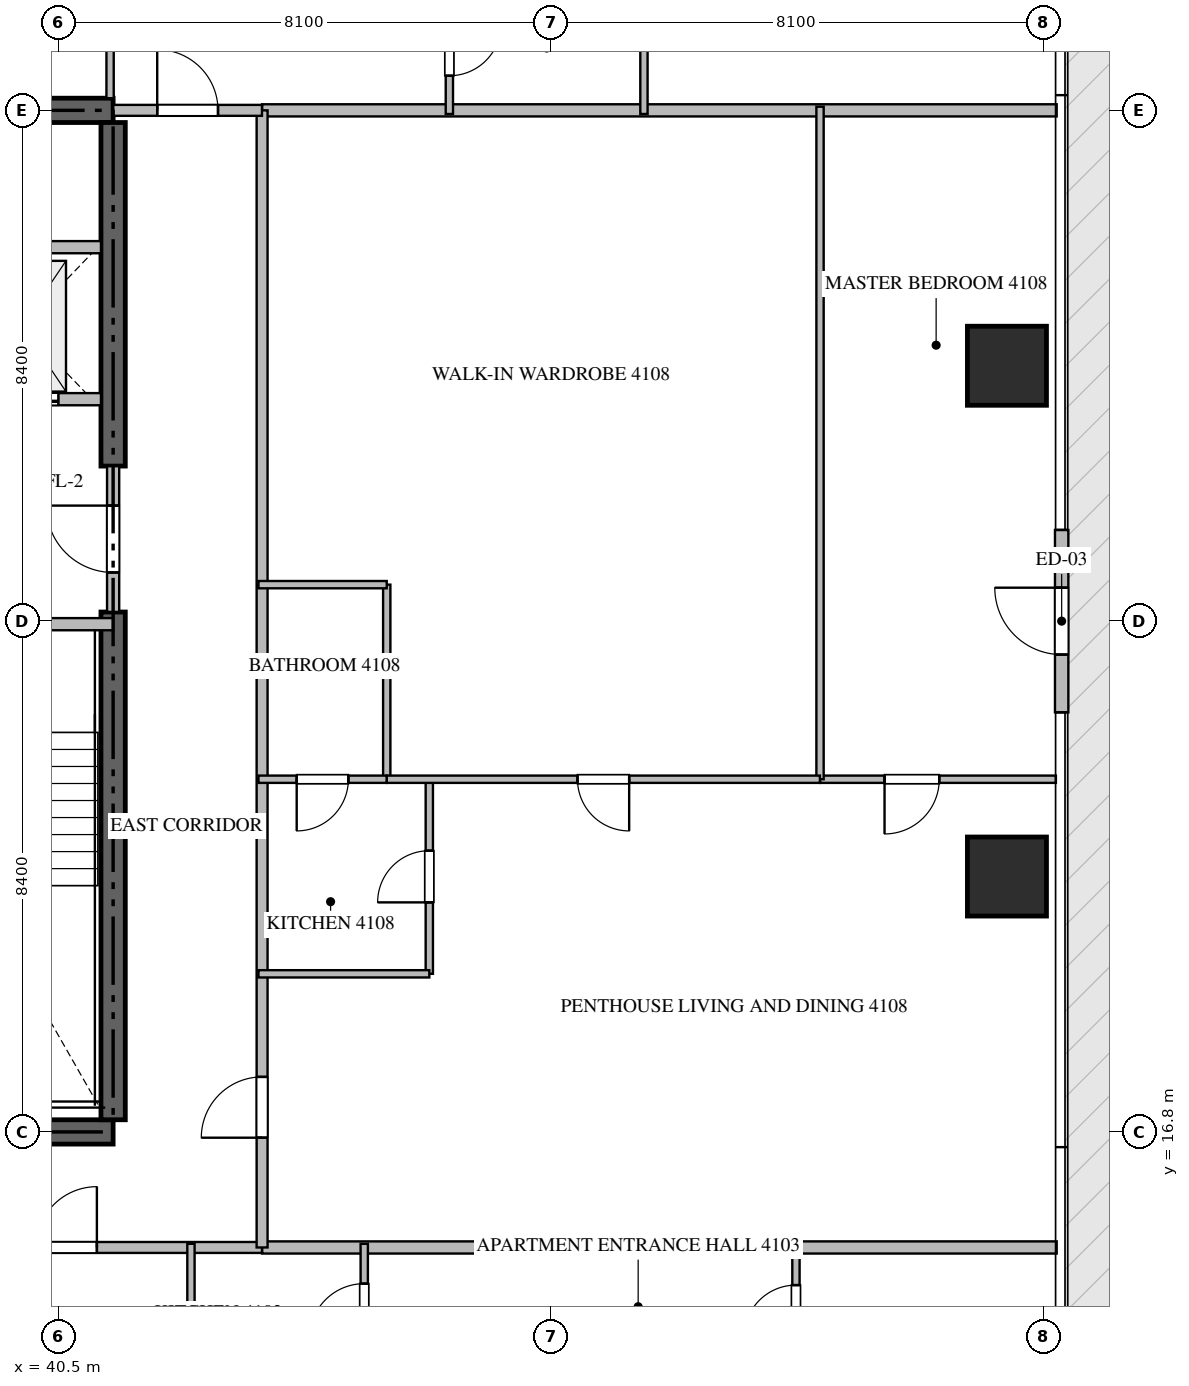
"""IFC4 building model, lengths in metres.
Left out: names, types, materials, properties, quantities, classifications, styles, units other than length and angle.
Written with IfcOpenShell. Run it as: python <this file> out.ifc"""

import sys

from ifc_helpers import new_model, si_unit, direction, frame, frame_2d, origin, origin_2d, place, context, subcontext, project, spatial, rectangle, extrude, source, transform, mapped, element, fill, save


model = new_model("IFC4")
c1 = context("Model", 3, precision=1e-05, world=origin(), true_north=direction((0.0, 1.0)))
c2 = subcontext(c1, "Body", "Model", "MODEL_VIEW")
j1 = project(units=[si_unit("LENGTHUNIT", "METRE"), si_unit("PLANEANGLEUNIT", "RADIAN")], contexts=[c1])
p1 = place(None, origin())
s1 = spatial("IfcSite", under=j1, at=p1, CompositionType="ELEMENT")
p2 = place(p1, origin())
s2 = spatial("IfcBuilding", under=s1, at=p2, CompositionType="ELEMENT")
p3 = place(p2, frame((0.0, 0.0, 165.15)))
s3 = spatial("IfcBuildingStorey", under=s2, at=p3, CompositionType="ELEMENT", Elevation=165.15)
for number, where, z_axis, x_axis in (
    (1, (23.4, 16.8, -0.26), (0.0, 0.0, 1.0), (1.0, 0.0, 0.0)),
    (2, (41.4, 33.6, -0.26), (0.0, 0.0, 1.0), (-1.0, 0.0, 0.0)),
):
    element("IfcWall", number, at=place(p3, frame(where, z_axis=z_axis, x_axis=x_axis)), inside=s3, PredefinedType="SHEAR", context=c2, shape_type="SweptSolid", body=[
        extrude(rectangle(XDim=18.0, YDim=0.4, at=frame_2d((9.0, 0.0))), origin(), (0.0, 0.0, 1.0), 3.748),
    ])
p4 = place(p3, frame((41.4, 17.0, -0.26), z_axis=(0.0, 0.0, 1.0), x_axis=(0.0, 1.0, 0.0)))
e3 = element("IfcWall", 3, at=p4, inside=s3, PredefinedType="SHEAR", context=c2, shape_type="SweptSolid", body=[
    extrude(rectangle(XDim=8.35, YDim=0.4, at=frame_2d((4.175, 0.0))), origin(), (0.0, 0.0, 1.0), 3.748),
])
p5 = place(p3, frame((41.4, 27.75, -0.26), z_axis=(0.0, 0.0, 1.0), x_axis=(0.0, 1.0, 0.0)))
e4 = element("IfcWall", 4, at=p5, inside=s3, PredefinedType="SHEAR", context=c2, shape_type="SweptSolid", body=[
    extrude(rectangle(XDim=5.65, YDim=0.4, at=frame_2d((2.825, 0.0))), origin(), (0.0, 0.0, 1.0), 3.748),
])
m1 = source(origin(), c2, "Body", "SweptSolid", [
    extrude(rectangle(XDim=1.3, YDim=1.3, at=origin_2d()), origin(), (0.0, 0.0, 1.0), 3.75),
])
for number, where, z_axis, x_axis in (
    (5, (56.1, 21.0, -0.26), (0.0, 0.0, 1.0), (1.0, 0.0, 0.0)),
    (6, (56.1, 29.4, -0.26), (0.0, 0.0, 1.0), (1.0, 0.0, 0.0)),
):
    element("IfcColumn", number, at=place(p3, frame(where, z_axis=z_axis, x_axis=x_axis)), inside=s3, PredefinedType="COLUMN", context=c2, shape_type="MappedRepresentation", body=[
        mapped(m1, transform((0.0, 0.0, 0.0), scale=1.0)),
    ])
p6 = place(p3, frame((57.0, 23.7, 0.0), z_axis=(0.0, 0.0, 1.0), x_axis=(0.0, 1.0, 0.0)))
e7 = element("IfcWall", 7, at=p6, inside=s3, PredefinedType="ELEMENTEDWALL", context=c2, shape_type="SweptSolid", body=[
    extrude(rectangle(XDim=3.0, YDim=0.22, at=frame_2d((1.5, 0.0))), origin(), (0.0, 0.0, 1.0), 3.475),
])
p7 = place(p6, frame((0.95, 0.0, 0.0)))
e8 = element("IfcOpeningElement", 8, at=p7, cuts=e7, PredefinedType="OPENING", context=c2, shape_type="SweptSolid", body=[
    extrude(rectangle(XDim=1.1, YDim=2.2, at=frame_2d((0.55, 1.1))), frame((0.0, 0.12, 0.0), z_axis=(0.0, -1.0, 0.0), x_axis=(1.0, 0.0, 0.0)), (0.0, 0.0, 1.0), 0.24),
])
p8 = place(p3, frame((36.95, 25.15, 0.0), z_axis=(0.0, 0.0, 1.0), x_axis=(1.0, 0.0, 0.0)))
e9 = element("IfcWall", 9, at=p8, inside=s3, PredefinedType="STANDARD", context=c2, shape_type="SweptSolid", body=[
    extrude(rectangle(XDim=4.45, YDim=0.2, at=frame_2d((2.225, 0.0))), origin(), (0.0, 0.0, 1.0), 3.49),
])
p9 = place(p8, frame((1.65, 0.0, 0.0)))
e10 = element("IfcOpeningElement", 10, at=p9, cuts=e9, PredefinedType="OPENING", context=c2, shape_type="SweptSolid", body=[
    extrude(rectangle(XDim=1.1, YDim=2.15, at=frame_2d((0.55, 1.075))), frame((0.0, 0.11, 0.0), z_axis=(0.0, -1.0, 0.0), x_axis=(1.0, 0.0, 0.0)), (0.0, 0.0, 1.0), 0.22),
])
p10 = place(p3, frame((38.75, 28.85, 0.0), z_axis=(0.0, 0.0, 1.0), x_axis=(1.0, 0.0, 0.0)))
e11 = element("IfcWall", 11, at=p10, inside=s3, PredefinedType="STANDARD", context=c2, shape_type="SweptSolid", body=[
    extrude(rectangle(XDim=2.45, YDim=0.2, at=frame_2d((1.225, 0.0))), origin(), (0.0, 0.0, 1.0), 3.49),
])
p11 = place(p10, frame((0.55, 0.0, 0.0)))
e12 = element("IfcOpeningElement", 12, at=p11, cuts=e11, PredefinedType="OPENING", context=c2, shape_type="SweptSolid", body=[
    extrude(rectangle(XDim=1.2, YDim=2.2, at=frame_2d((0.6, 1.1))), frame((0.0, 0.11, 0.0), z_axis=(0.0, -1.0, 0.0), x_axis=(1.0, 0.0, 0.0)), (0.0, 0.0, 1.0), 0.22),
])
p12 = place(p3, frame((38.75, 31.35, 0.0), z_axis=(0.0, 0.0, 1.0), x_axis=(1.0, 0.0, 0.0)))
e13 = element("IfcWall", 13, at=p12, inside=s3, PredefinedType="STANDARD", context=c2, shape_type="SweptSolid", body=[
    extrude(rectangle(XDim=2.45, YDim=0.2, at=frame_2d((1.225, 0.0))), origin(), (0.0, 0.0, 1.0), 3.49),
])
p13 = place(p3, frame((41.4, 25.352, 0.0), z_axis=(0.0, 0.0, 1.0), x_axis=(0.0, 1.0, 0.0)))
e14 = element("IfcWall", 14, at=p13, inside=s3, PredefinedType="STANDARD", context=c2, shape_type="SweptSolid", body=[
    extrude(rectangle(XDim=2.396, YDim=0.2, at=frame_2d((1.198, 0.0))), origin(), (0.0, 0.0, 1.0), 3.49),
])
p14 = place(p13, frame((0.648, 0.0, 0.0)))
e15 = element("IfcOpeningElement", 15, at=p14, cuts=e14, PredefinedType="OPENING", context=c2, shape_type="SweptSolid", body=[
    extrude(rectangle(XDim=1.1, YDim=2.15, at=frame_2d((0.55, 1.075))), frame((0.0, 0.11, 0.0), z_axis=(0.0, -1.0, 0.0), x_axis=(1.0, 0.0, 0.0)), (0.0, 0.0, 1.0), 0.22),
])
for number, where, z_axis, x_axis in (
    (16, (43.85, 14.9, 0.0), (0.0, 0.0, 1.0), (1.0, 0.0, 0.0)),
    (17, (43.85, 33.6, 0.0), (0.0, 0.0, 1.0), (1.0, 0.0, 0.0)),
):
    element("IfcWall", number, at=place(p3, frame(where, z_axis=z_axis, x_axis=x_axis)), inside=s3, PredefinedType="PARTITIONING", context=c2, shape_type="SweptSolid", body=[
        extrude(rectangle(XDim=13.068, YDim=0.2, at=frame_2d((6.534, 0.0))), origin(), (0.0, 0.0, 1.0), 3.49),
    ])
p15 = place(p3, frame((20.952, 14.9, 0.0), z_axis=(0.0, 0.0, 1.0), x_axis=(1.0, 0.0, 0.0)))
e18 = element("IfcWall", 18, at=p15, inside=s3, PredefinedType="PARTITIONING", context=c2, shape_type="SweptSolid", body=[
    extrude(rectangle(XDim=22.896, YDim=0.18, at=frame_2d((11.448, 0.0))), origin(), (0.0, 0.0, 1.0), 3.49),
])
p16 = place(p15, frame((2.387, 0.0, 0.0)))
e19 = element("IfcOpeningElement", 19, at=p16, cuts=e18, PredefinedType="OPENING", context=c2, shape_type="SweptSolid", body=[
    extrude(rectangle(XDim=1.0, YDim=2.15, at=frame_2d((0.5, 1.075))), frame((0.0, 0.1, 0.0), z_axis=(0.0, -1.0, 0.0), x_axis=(1.0, 0.0, 0.0)), (0.0, 0.0, 1.0), 0.2),
])
p17 = place(p15, frame((6.788, 0.0, 0.0)))
e20 = element("IfcOpeningElement", 20, at=p17, cuts=e18, PredefinedType="OPENING", context=c2, shape_type="SweptSolid", body=[
    extrude(rectangle(XDim=1.0, YDim=2.15, at=frame_2d((0.5, 1.075))), frame((0.0, 0.1, 0.0), z_axis=(0.0, -1.0, 0.0), x_axis=(1.0, 0.0, 0.0)), (0.0, 0.0, 1.0), 0.2),
])
p18 = place(p15, frame((19.181, 0.0, 0.0)))
e21 = element("IfcOpeningElement", 21, at=p18, cuts=e18, PredefinedType="OPENING", context=c2, shape_type="SweptSolid", body=[
    extrude(rectangle(XDim=1.0, YDim=2.15, at=frame_2d((0.5, 1.075))), frame((0.0, 0.1, 0.0), z_axis=(0.0, -1.0, 0.0), x_axis=(1.0, 0.0, 0.0)), (0.0, 0.0, 1.0), 0.2),
])
p19 = place(p3, frame((43.85, 14.9, 0.0), z_axis=(0.0, 0.0, 1.0), x_axis=(0.0, 1.0, 0.0)))
e22 = element("IfcWall", 22, at=p19, inside=s3, PredefinedType="PARTITIONING", context=c2, shape_type="SweptSolid", body=[
    extrude(rectangle(XDim=18.7, YDim=0.18, at=frame_2d((9.35, 0.0))), origin(), (0.0, 0.0, 1.0), 3.49),
])
p20 = place(p19, frame((1.805, 0.0, 0.0)))
e23 = element("IfcOpeningElement", 23, at=p20, cuts=e22, PredefinedType="OPENING", context=c2, shape_type="SweptSolid", body=[
    extrude(rectangle(XDim=1.0, YDim=2.15, at=frame_2d((0.5, 1.075))), frame((0.0, 0.1, 0.0), z_axis=(0.0, -1.0, 0.0), x_axis=(1.0, 0.0, 0.0)), (0.0, 0.0, 1.0), 0.2),
])
p21 = place(p3, frame((41.402, 33.6, 0.0), z_axis=(0.0, 0.0, 1.0), x_axis=(1.0, 0.0, 0.0)))
e24 = element("IfcWall", 24, at=p21, inside=s3, PredefinedType="PARTITIONING", context=c2, shape_type="SweptSolid", body=[
    extrude(rectangle(XDim=2.446, YDim=0.18, at=frame_2d((1.223, 0.0))), origin(), (0.0, 0.0, 1.0), 3.49),
])
p22 = place(p21, frame((0.723, 0.0, 0.0)))
e25 = element("IfcOpeningElement", 25, at=p22, cuts=e24, PredefinedType="OPENING", context=c2, shape_type="SweptSolid", body=[
    extrude(rectangle(XDim=1.0, YDim=2.15, at=frame_2d((0.5, 1.075))), frame((0.0, 0.1, 0.0), z_axis=(0.0, -1.0, 0.0), x_axis=(1.0, 0.0, 0.0)), (0.0, 0.0, 1.0), 0.2),
])
p23 = place(p3, frame((42.68, 12.15, 0.0), z_axis=(0.0, 0.0, 1.0), x_axis=(0.0, 1.0, 0.0)))
e26 = element("IfcWall", 26, at=p23, inside=s3, PredefinedType="PARTITIONING", context=c2, shape_type="SweptSolid", body=[
    extrude(rectangle(XDim=2.81, YDim=0.12, at=frame_2d((1.405, 0.0))), origin(), (0.0, 0.0, 1.0), 3.49),
])
p24 = place(p3, frame((45.53, 12.75, 0.0), z_axis=(0.0, 0.0, 1.0), x_axis=(0.0, 1.0, 0.0)))
e27 = element("IfcWall", 27, at=p24, inside=s3, PredefinedType="PARTITIONING", context=c2, shape_type="SweptSolid", body=[
    extrude(rectangle(XDim=2.21, YDim=0.12, at=frame_2d((1.105, 0.0))), origin(), (0.0, 0.0, 1.0), 3.49),
])
p25 = place(p24, frame((0.655, 0.0, 0.0)))
e28 = element("IfcOpeningElement", 28, at=p25, cuts=e27, PredefinedType="OPENING", context=c2, shape_type="SweptSolid", body=[
    extrude(rectangle(XDim=0.9, YDim=2.1, at=frame_2d((0.45, 1.05))), frame((0.0, 0.07, 0.0), z_axis=(0.0, -1.0, 0.0), x_axis=(1.0, 0.0, 0.0)), (0.0, 0.0, 1.0), 0.14),
])
p26 = place(p3, frame((52.63, 12.752, 0.0), z_axis=(0.0, 0.0, 1.0), x_axis=(0.0, 1.0, 0.0)))
e29 = element("IfcWall", 29, at=p26, inside=s3, PredefinedType="PARTITIONING", context=c2, shape_type="SweptSolid", body=[
    extrude(rectangle(XDim=2.208, YDim=0.12, at=frame_2d((1.104, 0.0))), origin(), (0.0, 0.0, 1.0), 3.49),
])
p27 = place(p26, frame((0.679, 0.0, 0.0)))
e30 = element("IfcOpeningElement", 30, at=p27, cuts=e29, PredefinedType="OPENING", context=c2, shape_type="SweptSolid", body=[
    extrude(rectangle(XDim=0.85, YDim=2.1, at=frame_2d((0.425, 1.05))), frame((0.0, 0.07, 0.0), z_axis=(0.0, -1.0, 0.0), x_axis=(1.0, 0.0, 0.0)), (0.0, 0.0, 1.0), 0.14),
])
p28 = place(p3, frame((41.35, 36.35, 0.0), z_axis=(0.0, 0.0, 1.0), x_axis=(0.0, -1.0, 0.0)))
e31 = element("IfcWall", 31, at=p28, inside=s3, PredefinedType="PARTITIONING", context=c2, shape_type="SweptSolid", body=[
    extrude(rectangle(XDim=2.55, YDim=0.12, at=frame_2d((1.275, 0.0))), origin(), (0.0, 0.0, 1.0), 3.49),
])
p29 = place(p3, frame((50.13, 35.65, 0.0), z_axis=(0.0, 0.0, 1.0), x_axis=(0.0, -1.0, 0.0)))
e32 = element("IfcWall", 32, at=p29, inside=s3, PredefinedType="PARTITIONING", context=c2, shape_type="SweptSolid", body=[
    extrude(rectangle(XDim=2.11, YDim=0.12, at=frame_2d((1.055, 0.0))), origin(), (0.0, 0.0, 1.0), 3.49),
])
p30 = place(p3, frame((46.93, 35.648, 0.0), z_axis=(0.0, 0.0, 1.0), x_axis=(0.0, -1.0, 0.0)))
e33 = element("IfcWall", 33, at=p30, inside=s3, PredefinedType="PARTITIONING", context=c2, shape_type="SweptSolid", body=[
    extrude(rectangle(XDim=2.108, YDim=0.12, at=frame_2d((1.054, 0.0))), origin(), (0.0, 0.0, 1.0), 3.49),
])
p31 = place(p30, frame((0.629, 0.0, 0.0)))
e34 = element("IfcOpeningElement", 34, at=p31, cuts=e33, PredefinedType="OPENING", context=c2, shape_type="SweptSolid", body=[
    extrude(rectangle(XDim=0.85, YDim=2.1, at=frame_2d((0.425, 1.05))), frame((0.0, 0.07, 0.0), z_axis=(0.0, -1.0, 0.0), x_axis=(1.0, 0.0, 0.0)), (0.0, 0.0, 1.0), 0.14),
])
p32 = place(p3, frame((46.6, 19.4, 0.0), z_axis=(0.0, 0.0, 1.0), x_axis=(0.0, 1.0, 0.0)))
e35 = element("IfcWall", 35, at=p32, inside=s3, PredefinedType="PARTITIONING", context=c2, shape_type="SweptSolid", body=[
    extrude(rectangle(XDim=3.2, YDim=0.12, at=frame_2d((1.6, 0.0))), origin(), (0.0, 0.0, 1.0), 3.49),
])
p33 = place(p32, frame((1.175, 0.0, 0.0)))
e36 = element("IfcOpeningElement", 36, at=p33, cuts=e35, PredefinedType="OPENING", context=c2, shape_type="SweptSolid", body=[
    extrude(rectangle(XDim=0.85, YDim=2.1, at=frame_2d((0.425, 1.05))), frame((0.0, 0.07, 0.0), z_axis=(0.0, -1.0, 0.0), x_axis=(1.0, 0.0, 0.0)), (0.0, 0.0, 1.0), 0.14),
])
p34 = place(p3, frame((46.6, 19.4, 0.0), z_axis=(0.0, 0.0, 1.0), x_axis=(-1.0, 0.0, 0.0)))
e37 = element("IfcWall", 37, at=p34, inside=s3, PredefinedType="PARTITIONING", context=c2, shape_type="SweptSolid", body=[
    extrude(rectangle(XDim=2.81, YDim=0.12, at=frame_2d((1.405, 0.0))), origin(), (0.0, 0.0, 1.0), 3.49),
])
p35 = place(p3, frame((56.905, 22.6, 0.0), z_axis=(0.0, 0.0, 1.0), x_axis=(-1.0, 0.0, 0.0)))
e38 = element("IfcWall", 38, at=p35, inside=s3, PredefinedType="PARTITIONING", context=c2, shape_type="SweptSolid", body=[
    extrude(rectangle(XDim=3.879, YDim=0.12, at=frame_2d((1.939, 0.0))), origin(), (0.0, 0.0, 1.0), 3.49),
])
p36 = place(p35, frame((1.918, 0.0, 0.0)))
e39 = element("IfcOpeningElement", 39, at=p36, cuts=e38, PredefinedType="OPENING", context=c2, shape_type="SweptSolid", body=[
    extrude(rectangle(XDim=0.9, YDim=2.1, at=frame_2d((0.45, 1.05))), frame((0.0, 0.07, 0.0), z_axis=(0.0, -1.0, 0.0), x_axis=(1.0, 0.0, 0.0)), (0.0, 0.0, 1.0), 0.14),
])
p37 = place(p3, frame((53.026, 22.6, 0.0), z_axis=(0.0, 0.0, 1.0), x_axis=(0.0, 1.0, 0.0)))
e40 = element("IfcWall", 40, at=p37, inside=s3, PredefinedType="PARTITIONING", context=c2, shape_type="SweptSolid", body=[
    extrude(rectangle(XDim=11.06, YDim=0.12, at=frame_2d((5.53, 0.0))), origin(), (0.0, 0.0, 1.0), 3.49),
])
p38 = place(p3, frame((45.9, 22.6, 0.0), z_axis=(0.0, 0.0, 1.0), x_axis=(0.0, 1.0, 0.0)))
e41 = element("IfcWall", 41, at=p38, inside=s3, PredefinedType="PARTITIONING", context=c2, shape_type="SweptSolid", body=[
    extrude(rectangle(XDim=3.2, YDim=0.12, at=frame_2d((1.6, 0.0))), origin(), (0.0, 0.0, 1.0), 3.49),
])
p39 = place(p3, frame((45.9, 25.8, 0.0), z_axis=(0.0, 0.0, 1.0), x_axis=(-1.0, 0.0, 0.0)))
e42 = element("IfcWall", 42, at=p39, inside=s3, PredefinedType="PARTITIONING", context=c2, shape_type="SweptSolid", body=[
    extrude(rectangle(XDim=2.11, YDim=0.12, at=frame_2d((1.055, 0.0))), origin(), (0.0, 0.0, 1.0), 3.49),
])
p40 = place(p3, frame((53.024, 22.6, 0.0), z_axis=(0.0, 0.0, 1.0), x_axis=(-1.0, 0.0, 0.0)))
e43 = element("IfcWall", 43, at=p40, inside=s3, PredefinedType="PARTITIONING", context=c2, shape_type="SweptSolid", body=[
    extrude(rectangle(XDim=7.124, YDim=0.12, at=frame_2d((3.562, 0.0))), origin(), (0.0, 0.0, 1.0), 3.49),
])
p41 = place(p40, frame((3.137, 0.0, 0.0)))
e44 = element("IfcOpeningElement", 44, at=p41, cuts=e43, PredefinedType="OPENING", context=c2, shape_type="SweptSolid", body=[
    extrude(rectangle(XDim=0.85, YDim=2.1, at=frame_2d((0.425, 1.05))), frame((0.0, 0.07, 0.0), z_axis=(0.0, -1.0, 0.0), x_axis=(1.0, 0.0, 0.0)), (0.0, 0.0, 1.0), 0.14),
])
p42 = place(p3, frame((45.898, 22.6, 0.0), z_axis=(0.0, 0.0, 1.0), x_axis=(-1.0, 0.0, 0.0)))
e45 = element("IfcWall", 45, at=p42, inside=s3, PredefinedType="PARTITIONING", context=c2, shape_type="SweptSolid", body=[
    extrude(rectangle(XDim=2.108, YDim=0.12, at=frame_2d((1.054, 0.0))), origin(), (0.0, 0.0, 1.0), 3.49),
])
p43 = place(p42, frame((0.629, 0.0, 0.0)))
e46 = element("IfcOpeningElement", 46, at=p43, cuts=e45, PredefinedType="OPENING", context=c2, shape_type="SweptSolid", body=[
    extrude(rectangle(XDim=0.85, YDim=2.1, at=frame_2d((0.425, 1.05))), frame((0.0, 0.07, 0.0), z_axis=(0.0, -1.0, 0.0), x_axis=(1.0, 0.0, 0.0)), (0.0, 0.0, 1.0), 0.14),
])
m2 = source(origin(), c2, "Body", "SweptSolid", [
    extrude(rectangle(XDim=1.1, YDim=2.2, at=frame_2d((0.55, 1.1))), frame((0.0, 0.025, 0.0), z_axis=(0.0, -1.0, 0.0), x_axis=(1.0, 0.0, 0.0)), (0.0, 0.0, 1.0), 0.05),
])
p44 = place(p7, origin())
e47 = element("IfcDoor", 47, at=p44, inside=s3, OperationType="SINGLE_SWING_RIGHT", PredefinedType="DOOR", context=c2, shape_type="MappedRepresentation", body=[
    mapped(m2, transform((0.0, 0.0, 0.0), scale=1.0)),
])
fill(e8, e47)
m3 = source(origin(), c2, "Body", "SweptSolid", [
    extrude(rectangle(XDim=1.2, YDim=2.2, at=frame_2d((0.6, 1.1))), frame((0.0, 0.025, 0.0), z_axis=(0.0, -1.0, 0.0), x_axis=(1.0, 0.0, 0.0)), (0.0, 0.0, 1.0), 0.05),
])
p45 = place(p11, origin())
e48 = element("IfcDoor", 48, at=p45, inside=s3, OperationType="DOUBLE_DOOR_SLIDING", PredefinedType="DOOR", context=c2, shape_type="MappedRepresentation", body=[
    mapped(m3, transform((0.0, 0.0, 0.0), scale=1.0)),
])
fill(e12, e48)
m4 = source(origin(), c2, "Body", "SweptSolid", [
    extrude(rectangle(XDim=1.1, YDim=2.15, at=frame_2d((0.55, 1.075))), frame((0.0, 0.025, 0.0), z_axis=(0.0, -1.0, 0.0), x_axis=(1.0, 0.0, 0.0)), (0.0, 0.0, 1.0), 0.05),
])
p46 = place(p14, origin())
e49 = element("IfcDoor", 49, at=p46, inside=s3, OperationType="SINGLE_SWING_RIGHT", PredefinedType="DOOR", context=c2, shape_type="MappedRepresentation", body=[
    mapped(m4, transform((0.0, 0.0, 0.0), scale=1.0)),
])
fill(e15, e49)
m5 = source(origin(), c2, "Body", "SweptSolid", [
    extrude(rectangle(XDim=1.0, YDim=2.15, at=frame_2d((0.5, 1.075))), frame((0.0, 0.025, 0.0), z_axis=(0.0, -1.0, 0.0), x_axis=(1.0, 0.0, 0.0)), (0.0, 0.0, 1.0), 0.05),
])
p47 = place(p18, origin())
e50 = element("IfcDoor", 50, at=p47, inside=s3, OperationType="SINGLE_SWING_RIGHT", PredefinedType="DOOR", context=c2, shape_type="MappedRepresentation", body=[
    mapped(m5, transform((0.0, 0.0, 0.0), scale=1.0)),
])
fill(e21, e50)
p48 = place(p20, origin())
e51 = element("IfcDoor", 51, at=p48, inside=s3, OperationType="SINGLE_SWING_LEFT", PredefinedType="DOOR", context=c2, shape_type="MappedRepresentation", body=[
    mapped(m5, transform((0.0, 0.0, 0.0), scale=1.0)),
])
fill(e23, e51)
p49 = place(p22, origin())
e52 = element("IfcDoor", 52, at=p49, inside=s3, OperationType="SINGLE_SWING_LEFT", PredefinedType="DOOR", context=c2, shape_type="MappedRepresentation", body=[
    mapped(m5, transform((0.0, 0.0, 0.0), scale=1.0)),
])
fill(e25, e52)
m6 = source(origin(), c2, "Body", "SweptSolid", [
    extrude(rectangle(XDim=0.9, YDim=2.1, at=frame_2d((0.45, 1.05))), frame((0.0, 0.025, 0.0), z_axis=(0.0, -1.0, 0.0), x_axis=(1.0, 0.0, 0.0)), (0.0, 0.0, 1.0), 0.05),
])
p50 = place(p25, origin())
e53 = element("IfcDoor", 53, at=p50, inside=s3, OperationType="SINGLE_SWING_LEFT", PredefinedType="DOOR", context=c2, shape_type="MappedRepresentation", body=[
    mapped(m6, transform((0.0, 0.0, 0.0), scale=1.0)),
])
fill(e28, e53)
m7 = source(origin(), c2, "Body", "SweptSolid", [
    extrude(rectangle(XDim=0.85, YDim=2.1, at=frame_2d((0.425, 1.05))), frame((0.0, 0.025, 0.0), z_axis=(0.0, -1.0, 0.0), x_axis=(1.0, 0.0, 0.0)), (0.0, 0.0, 1.0), 0.05),
])
p51 = place(p27, origin())
e54 = element("IfcDoor", 54, at=p51, inside=s3, OperationType="SINGLE_SWING_LEFT", PredefinedType="DOOR", context=c2, shape_type="MappedRepresentation", body=[
    mapped(m7, transform((0.0, 0.0, 0.0), scale=1.0)),
])
fill(e30, e54)
p52 = place(p31, origin())
e55 = element("IfcDoor", 55, at=p52, inside=s3, OperationType="SINGLE_SWING_LEFT", PredefinedType="DOOR", context=c2, shape_type="MappedRepresentation", body=[
    mapped(m7, transform((0.0, 0.0, 0.0), scale=1.0)),
])
fill(e34, e55)
p53 = place(p33, origin())
e56 = element("IfcDoor", 56, at=p53, inside=s3, OperationType="SINGLE_SWING_LEFT", PredefinedType="DOOR", context=c2, shape_type="MappedRepresentation", body=[
    mapped(m7, transform((0.0, 0.0, 0.0), scale=1.0)),
])
fill(e36, e56)
p54 = place(p36, origin())
e57 = element("IfcDoor", 57, at=p54, inside=s3, OperationType="SINGLE_SWING_RIGHT", PredefinedType="DOOR", context=c2, shape_type="MappedRepresentation", body=[
    mapped(m6, transform((0.0, 0.0, 0.0), scale=1.0)),
])
fill(e39, e57)
p55 = place(p41, origin())
e58 = element("IfcDoor", 58, at=p55, inside=s3, OperationType="SINGLE_SWING_LEFT", PredefinedType="DOOR", context=c2, shape_type="MappedRepresentation", body=[
    mapped(m7, transform((0.0, 0.0, 0.0), scale=1.0)),
])
fill(e44, e58)
p56 = place(p43, origin())
e59 = element("IfcDoor", 59, at=p56, inside=s3, OperationType="SINGLE_SWING_RIGHT", PredefinedType="DOOR", context=c2, shape_type="MappedRepresentation", body=[
    mapped(m7, transform((0.0, 0.0, 0.0), scale=1.0)),
])
fill(e46, e59)
save(model, sys.argv[1])
